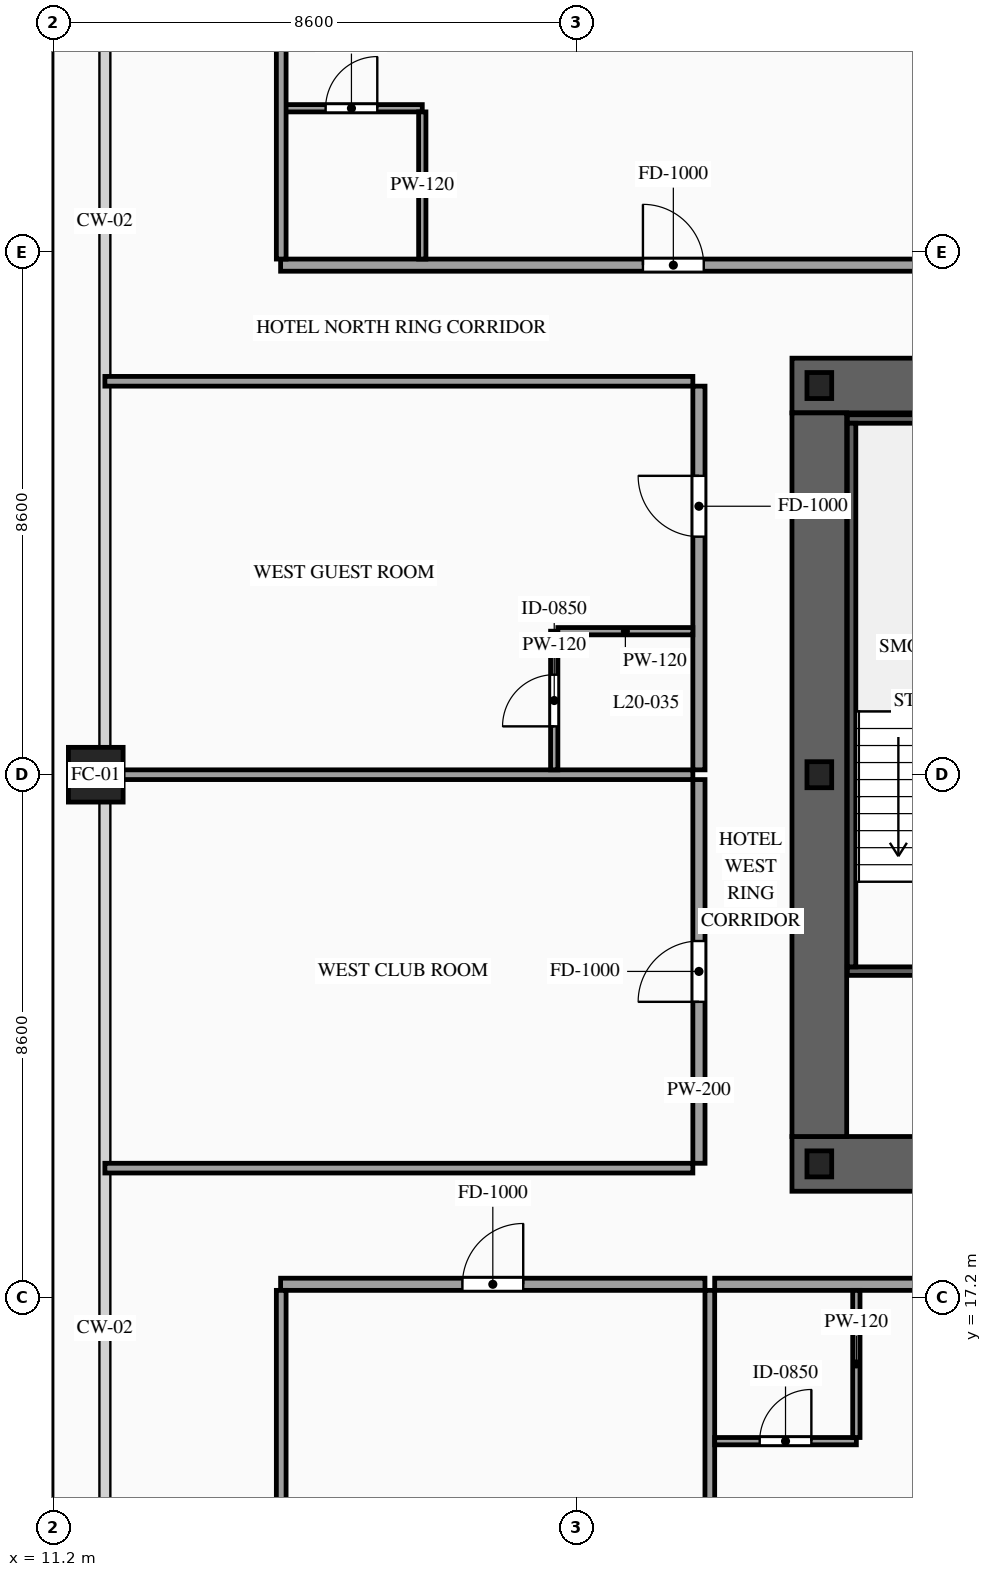
"""IFC4 building model, lengths in metres.
Left out: names, types, materials, properties, quantities, classifications, styles, units other than length and angle.
Written with IfcOpenShell. Run it as: python <this file> out.ifc"""

import sys

from ifc_helpers import new_model, si_unit, direction, frame, frame_2d, origin, origin_2d, place, context, subcontext, project, spatial, rectangle, hollow_rectangle, i_section, extrude, source, transform, mapped, element, fill, save


model = new_model("IFC4")
c1 = context("Model", 3, precision=1e-05, world=origin(), true_north=direction((0.0, 1.0)))
c2 = subcontext(c1, "Body", "Model", "MODEL_VIEW")
j1 = project(units=[si_unit("LENGTHUNIT", "METRE"), si_unit("PLANEANGLEUNIT", "RADIAN")], contexts=[c1])
p1 = place(None, origin())
s1 = spatial("IfcSite", under=j1, at=p1, CompositionType="ELEMENT")
p2 = place(p1, origin())
s2 = spatial("IfcBuilding", under=s1, at=p2, CompositionType="ELEMENT")
p3 = place(p2, frame((0.0, 0.0, 78.4)))
s3 = spatial("IfcBuildingStorey", under=s2, at=p3, CompositionType="ELEMENT", Elevation=78.4)
p4 = place(p3, frame((23.35, 19.4, 0.0), z_axis=(0.0, 0.0, 1.0), x_axis=(1.0, 0.0, 0.0)))
e1 = element("IfcWall", 1, at=p4, inside=s3, PredefinedType="SHEAR", context=c2, shape_type="SweptSolid", body=[
    extrude(rectangle(XDim=27.3, YDim=0.9, at=frame_2d((13.65, 0.0))), origin(), (0.0, 0.0, 1.0), 3.6),
])
p5 = place(p4, frame((2.1, 0.0, 0.0)))
e2 = element("IfcOpeningElement", 2, at=p5, cuts=e1, PredefinedType="OPENING", context=c2, shape_type="SweptSolid", body=[
    extrude(rectangle(XDim=1.1, YDim=2.2, at=frame_2d((0.55, 1.1))), frame((0.0, 0.465, 0.0), z_axis=(0.0, -1.0, 0.0), x_axis=(1.0, 0.0, 0.0)), (0.0, 0.0, 1.0), 0.93),
])
p6 = place(p4, frame((10.0, 0.0, 0.0)))
e3 = element("IfcOpeningElement", 3, at=p6, cuts=e1, PredefinedType="OPENING", context=c2, shape_type="SweptSolid", body=[
    extrude(rectangle(XDim=1.1, YDim=2.2, at=frame_2d((0.55, 1.1))), frame((0.0, 0.465, 0.0), z_axis=(0.0, -1.0, 0.0), x_axis=(1.0, 0.0, 0.0)), (0.0, 0.0, 1.0), 0.93),
])
p7 = place(p4, frame((23.2, 0.0, 0.0)))
e4 = element("IfcOpeningElement", 4, at=p7, cuts=e1, PredefinedType="OPENING", context=c2, shape_type="SweptSolid", body=[
    extrude(rectangle(XDim=1.1, YDim=2.2, at=frame_2d((0.55, 1.1))), frame((0.0, 0.465, 0.0), z_axis=(0.0, -1.0, 0.0), x_axis=(1.0, 0.0, 0.0)), (0.0, 0.0, 1.0), 0.93),
])
p8 = place(p4, frame((19.82, 0.0, 0.0)))
e5 = element("IfcOpeningElement", 5, at=p8, cuts=e1, PredefinedType="OPENING", context=c2, shape_type="SweptSolid", body=[
    extrude(rectangle(XDim=0.9, YDim=2.15, at=frame_2d((0.45, 1.075))), frame((0.0, 0.465, 0.0), z_axis=(0.0, -1.0, 0.0), x_axis=(1.0, 0.0, 0.0)), (0.0, 0.0, 1.0), 0.93),
])
p9 = place(p4, frame((18.38, 0.0, 0.0)))
e6 = element("IfcOpeningElement", 6, at=p9, cuts=e1, PredefinedType="OPENING", context=c2, shape_type="SweptSolid", body=[
    extrude(rectangle(XDim=0.9, YDim=2.15, at=frame_2d((0.45, 1.075))), frame((0.0, 0.465, 0.0), z_axis=(0.0, -1.0, 0.0), x_axis=(1.0, 0.0, 0.0)), (0.0, 0.0, 1.0), 0.93),
])
p10 = place(p3, frame((23.35, 32.2, 0.0), z_axis=(0.0, 0.0, 1.0), x_axis=(1.0, 0.0, 0.0)))
e7 = element("IfcWall", 7, at=p10, inside=s3, PredefinedType="SHEAR", context=c2, shape_type="SweptSolid", body=[
    extrude(rectangle(XDim=27.3, YDim=0.9, at=frame_2d((13.65, 0.0))), origin(), (0.0, 0.0, 1.0), 3.6),
])
p11 = place(p10, frame((4.72, 0.0, 0.0)))
e8 = element("IfcOpeningElement", 8, at=p11, cuts=e7, PredefinedType="OPENING", context=c2, shape_type="SweptSolid", body=[
    extrude(rectangle(XDim=0.9, YDim=2.15, at=frame_2d((0.45, 1.075))), frame((0.0, 0.465, 0.0), z_axis=(0.0, -1.0, 0.0), x_axis=(1.0, 0.0, 0.0)), (0.0, 0.0, 1.0), 0.93),
])
p12 = place(p10, frame((10.0, 0.0, 0.0)))
e9 = element("IfcOpeningElement", 9, at=p12, cuts=e7, PredefinedType="OPENING", context=c2, shape_type="SweptSolid", body=[
    extrude(rectangle(XDim=1.1, YDim=2.2, at=frame_2d((0.55, 1.1))), frame((0.0, 0.465, 0.0), z_axis=(0.0, -1.0, 0.0), x_axis=(1.0, 0.0, 0.0)), (0.0, 0.0, 1.0), 0.93),
])
p13 = place(p10, frame((15.85, 0.0, 0.0)))
e10 = element("IfcOpeningElement", 10, at=p13, cuts=e7, PredefinedType="OPENING", context=c2, shape_type="SweptSolid", body=[
    extrude(rectangle(XDim=1.1, YDim=2.2, at=frame_2d((0.55, 1.1))), frame((0.0, 0.465, 0.0), z_axis=(0.0, -1.0, 0.0), x_axis=(1.0, 0.0, 0.0)), (0.0, 0.0, 1.0), 0.93),
])
m1 = source(origin(), c2, "Body", "SweptSolid", [
    extrude(rectangle(XDim=11.9, YDim=0.9, at=frame_2d((5.95, 0.0))), origin(), (0.0, 0.0, 1.0), 3.6),
])
p14 = place(p3, frame((23.8, 19.85, 0.0), z_axis=(0.0, 0.0, 1.0), x_axis=(0.0, 1.0, 0.0)))
e11 = element("IfcWall", 11, at=p14, inside=s3, PredefinedType="SHEAR", context=c2, shape_type="MappedRepresentation", body=[
    mapped(m1, transform((0.0, 0.0, 0.0), scale=1.0)),
])
m2 = source(origin(), c2, "Body", "SweptSolid", [
    extrude(i_section(OverallWidth=0.407, OverallDepth=0.428, WebThickness=0.02, FlangeThickness=0.035, at=origin_2d()), origin(), (0.0, 0.0, 1.0), 3.6),
])
for number, where, z_axis, x_axis in (
    (12, (23.8, 19.4, 0.0), (0.0, 0.0, 1.0), (1.0, 0.0, 0.0)),
    (13, (23.8, 25.8, 0.0), (0.0, 0.0, 1.0), (1.0, 0.0, 0.0)),
    (14, (23.8, 32.2, 0.0), (0.0, 0.0, 1.0), (1.0, 0.0, 0.0)),
):
    element("IfcColumn", number, at=place(p3, frame(where, z_axis=z_axis, x_axis=x_axis)), inside=s3, PredefinedType="COLUMN", context=c2, shape_type="MappedRepresentation", body=[
        mapped(m2, transform((0.0, 0.0, 0.0), scale=1.0)),
    ])
m3 = source(origin(), c2, "Body", "SweptSolid", [
    extrude(hollow_rectangle(XDim=0.9, YDim=0.9, WallThickness=0.042, at=origin_2d()), origin(), (0.0, 0.0, 1.0), 3.6),
])
p15 = place(p3, frame((11.9, 25.8, 0.0), z_axis=(0.0, 0.0, 1.0), x_axis=(1.0, 0.0, 0.0)))
e15 = element("IfcColumn", 15, at=p15, inside=s3, PredefinedType="COLUMN", context=c2, shape_type="MappedRepresentation", body=[
    mapped(m3, transform((0.0, 0.0, 0.0), scale=1.0)),
])
p16 = place(p3, frame((24.26, 22.57, 0.0), z_axis=(0.0, 0.0, 1.0), x_axis=(1.0, 0.0, 0.0)))
e16 = element("IfcWall", 16, at=p16, inside=s3, PredefinedType="SOLIDWALL", context=c2, shape_type="SweptSolid", body=[
    extrude(rectangle(XDim=3.28, YDim=0.14, at=frame_2d((1.64, 0.0))), origin(), (0.0, 0.0, 1.0), 3.38),
])
p17 = place(p16, frame((1.09, 0.0, 0.0)))
e17 = element("IfcOpeningElement", 17, at=p17, cuts=e16, PredefinedType="OPENING", context=c2, shape_type="SweptSolid", body=[
    extrude(rectangle(XDim=1.1, YDim=2.2, at=frame_2d((0.55, 1.1))), frame((0.0, 0.085, 0.0), z_axis=(0.0, -1.0, 0.0), x_axis=(1.0, 0.0, 0.0)), (0.0, 0.0, 1.0), 0.17),
])
m4 = source(origin(), c2, "Body", "SweptSolid", [
    extrude(rectangle(XDim=3.28, YDim=0.14, at=frame_2d((1.64, 0.0))), origin(), (0.0, 0.0, 1.0), 3.38),
])
p18 = place(p3, frame((24.26, 31.65, 0.0), z_axis=(0.0, 0.0, 1.0), x_axis=(1.0, 0.0, 0.0)))
e18 = element("IfcWall", 18, at=p18, inside=s3, PredefinedType="SOLIDWALL", context=c2, shape_type="MappedRepresentation", body=[
    mapped(m4, transform((0.0, 0.0, 0.0), scale=1.0)),
])
m5 = source(origin(), c2, "Body", "SweptSolid", [
    extrude(rectangle(XDim=8.94, YDim=0.14, at=frame_2d((4.47, 0.0))), origin(), (0.0, 0.0, 1.0), 3.38),
])
p19 = place(p3, frame((24.33, 22.64, 0.0), z_axis=(0.0, 0.0, 1.0), x_axis=(0.0, 1.0, 0.0)))
e19 = element("IfcWall", 19, at=p19, inside=s3, PredefinedType="SOLIDWALL", context=c2, shape_type="MappedRepresentation", body=[
    mapped(m5, transform((0.0, 0.0, 0.0), scale=1.0)),
])
p20 = place(p3, frame((14.94, 17.42, 0.0), z_axis=(0.0, 0.0, 1.0), x_axis=(1.0, 0.0, 0.0)))
e20 = element("IfcWall", 20, at=p20, inside=s3, PredefinedType="PARTITIONING", context=c2, shape_type="SweptSolid", body=[
    extrude(rectangle(XDim=6.979, YDim=0.2, at=frame_2d((3.49, 0.0))), origin(), (0.0, 0.0, 1.0), 3.38),
])
p21 = place(p20, frame((2.99, 0.0, 0.0)))
e21 = element("IfcOpeningElement", 21, at=p21, cuts=e20, PredefinedType="OPENING", context=c2, shape_type="SweptSolid", body=[
    extrude(rectangle(XDim=1.0, YDim=2.2, at=frame_2d((0.5, 1.1))), frame((0.0, 0.115, 0.0), z_axis=(0.0, -1.0, 0.0), x_axis=(1.0, 0.0, 0.0)), (0.0, 0.0, 1.0), 0.23),
])
m6 = source(origin(), c2, "Body", "SweptSolid", [
    extrude(rectangle(XDim=16.47, YDim=0.16, at=frame_2d((8.235, 0.0))), origin(), (0.0, 0.0, 1.0), 3.38),
])
p22 = place(p3, frame((21.999, 0.85, 0.0), z_axis=(0.0, 0.0, 1.0), x_axis=(0.0, 1.0, 0.0)))
e22 = element("IfcWall", 22, at=p22, inside=s3, PredefinedType="PARTITIONING", context=c2, shape_type="MappedRepresentation", body=[
    mapped(m6, transform((0.0, 0.0, 0.0), scale=1.0)),
])
p23 = place(p3, frame((22.079, 17.42, 0.0), z_axis=(0.0, 0.0, 1.0), x_axis=(1.0, 0.0, 0.0)))
e23 = element("IfcWall", 23, at=p23, inside=s3, PredefinedType="PARTITIONING", context=c2, shape_type="SweptSolid", body=[
    extrude(rectangle(XDim=11.488, YDim=0.2, at=frame_2d((5.744, 0.0))), origin(), (0.0, 0.0, 1.0), 3.38),
])
p24 = place(p23, frame((6.449, 0.0, 0.0)))
e24 = element("IfcOpeningElement", 24, at=p24, cuts=e23, PredefinedType="OPENING", context=c2, shape_type="SweptSolid", body=[
    extrude(rectangle(XDim=1.0, YDim=2.2, at=frame_2d((0.5, 1.1))), frame((0.0, 0.115, 0.0), z_axis=(0.0, -1.0, 0.0), x_axis=(1.0, 0.0, 0.0)), (0.0, 0.0, 1.0), 0.23),
])
p25 = place(p3, frame((22.079, 14.84, 0.0), z_axis=(0.0, 0.0, 1.0), x_axis=(1.0, 0.0, 0.0)))
e25 = element("IfcWall", 25, at=p25, inside=s3, PredefinedType="PARTITIONING", context=c2, shape_type="SweptSolid", body=[
    extrude(rectangle(XDim=2.33, YDim=0.12, at=frame_2d((1.165, 0.0))), origin(), (0.0, 0.0, 1.0), 3.38),
])
p26 = place(p25, frame((0.74, 0.0, 0.0)))
e26 = element("IfcOpeningElement", 26, at=p26, cuts=e25, PredefinedType="OPENING", context=c2, shape_type="SweptSolid", body=[
    extrude(rectangle(XDim=0.85, YDim=2.1, at=frame_2d((0.425, 1.05))), frame((0.0, 0.075, 0.0), z_axis=(0.0, -1.0, 0.0), x_axis=(1.0, 0.0, 0.0)), (0.0, 0.0, 1.0), 0.15),
])
m7 = source(origin(), c2, "Body", "SweptSolid", [
    extrude(rectangle(XDim=2.42, YDim=0.12, at=frame_2d((1.21, 0.0))), origin(), (0.0, 0.0, 1.0), 3.38),
])
p27 = place(p3, frame((24.409, 14.9, 0.0), z_axis=(0.0, 0.0, 1.0), x_axis=(0.0, 1.0, 0.0)))
e27 = element("IfcWall", 27, at=p27, inside=s3, PredefinedType="PARTITIONING", context=c2, shape_type="MappedRepresentation", body=[
    mapped(m7, transform((0.0, 0.0, 0.0), scale=1.0)),
])
m8 = source(origin(), c2, "Body", "SweptSolid", [
    extrude(rectangle(XDim=16.32, YDim=0.16, at=frame_2d((8.16, 0.0))), origin(), (0.0, 0.0, 1.0), 3.38),
])
p28 = place(p3, frame((14.95, 1.0, 0.0), z_axis=(0.0, 0.0, 1.0), x_axis=(0.0, 1.0, 0.0)))
e28 = element("IfcWall", 28, at=p28, inside=s3, PredefinedType="PARTITIONING", context=c2, shape_type="MappedRepresentation", body=[
    mapped(m8, transform((0.0, 0.0, 0.0), scale=1.0)),
])
p29 = place(p3, frame((14.94, 34.18, 0.0), z_axis=(0.0, 0.0, 1.0), x_axis=(1.0, 0.0, 0.0)))
e29 = element("IfcWall", 29, at=p29, inside=s3, PredefinedType="PARTITIONING", context=c2, shape_type="SweptSolid", body=[
    extrude(rectangle(XDim=10.509, YDim=0.2, at=frame_2d((5.254, 0.0))), origin(), (0.0, 0.0, 1.0), 3.38),
])
p30 = place(p29, frame((5.959, 0.0, 0.0)))
e30 = element("IfcOpeningElement", 30, at=p30, cuts=e29, PredefinedType="OPENING", context=c2, shape_type="SweptSolid", body=[
    extrude(rectangle(XDim=1.0, YDim=2.2, at=frame_2d((0.5, 1.1))), frame((0.0, 0.115, 0.0), z_axis=(0.0, -1.0, 0.0), x_axis=(1.0, 0.0, 0.0)), (0.0, 0.0, 1.0), 0.23),
])
p31 = place(p3, frame((14.94, 36.76, 0.0), z_axis=(0.0, 0.0, 1.0), x_axis=(1.0, 0.0, 0.0)))
e31 = element("IfcWall", 31, at=p31, inside=s3, PredefinedType="PARTITIONING", context=c2, shape_type="SweptSolid", body=[
    extrude(rectangle(XDim=2.33, YDim=0.12, at=frame_2d((1.165, 0.0))), origin(), (0.0, 0.0, 1.0), 3.38),
])
p32 = place(p31, frame((0.74, 0.0, 0.0)))
e32 = element("IfcOpeningElement", 32, at=p32, cuts=e31, PredefinedType="OPENING", context=c2, shape_type="SweptSolid", body=[
    extrude(rectangle(XDim=0.85, YDim=2.1, at=frame_2d((0.425, 1.05))), frame((0.0, 0.075, 0.0), z_axis=(0.0, -1.0, 0.0), x_axis=(1.0, 0.0, 0.0)), (0.0, 0.0, 1.0), 0.15),
])
m9 = source(origin(), c2, "Body", "SweptSolid", [
    extrude(rectangle(XDim=2.42, YDim=0.12, at=frame_2d((1.21, 0.0))), origin(), (0.0, 0.0, 1.0), 3.38),
])
p33 = place(p3, frame((17.27, 34.28, 0.0), z_axis=(0.0, 0.0, 1.0), x_axis=(0.0, 1.0, 0.0)))
e33 = element("IfcWall", 33, at=p33, inside=s3, PredefinedType="PARTITIONING", context=c2, shape_type="MappedRepresentation", body=[
    mapped(m9, transform((0.0, 0.0, 0.0), scale=1.0)),
])
p34 = place(p3, frame((14.95, 34.28, 0.0), z_axis=(0.0, 0.0, 1.0), x_axis=(0.0, 1.0, 0.0)))
e34 = element("IfcWall", 34, at=p34, inside=s3, PredefinedType="PARTITIONING", context=c2, shape_type="MappedRepresentation", body=[
    mapped(m8, transform((0.0, 0.0, 0.0), scale=1.0)),
])
p35 = place(p3, frame((21.82, 19.41, 0.0), z_axis=(0.0, 0.0, 1.0), x_axis=(0.0, 1.0, 0.0)))
e35 = element("IfcWall", 35, at=p35, inside=s3, PredefinedType="PARTITIONING", context=c2, shape_type="SweptSolid", body=[
    extrude(rectangle(XDim=6.31, YDim=0.2, at=frame_2d((3.155, 0.0))), origin(), (0.0, 0.0, 1.0), 3.38),
])
p36 = place(p35, frame((2.655, 0.0, 0.0)))
e36 = element("IfcOpeningElement", 36, at=p36, cuts=e35, PredefinedType="OPENING", context=c2, shape_type="SweptSolid", body=[
    extrude(rectangle(XDim=1.0, YDim=2.2, at=frame_2d((0.5, 1.1))), frame((0.0, 0.115, 0.0), z_axis=(0.0, -1.0, 0.0), x_axis=(1.0, 0.0, 0.0)), (0.0, 0.0, 1.0), 0.23),
])
m10 = source(origin(), c2, "Body", "SweptSolid", [
    extrude(rectangle(XDim=9.67, YDim=0.16, at=frame_2d((4.835, 0.0))), origin(), (0.0, 0.0, 1.0), 2.575),
])
p37 = place(p3, frame((12.05, 25.8, 0.0), z_axis=(0.0, 0.0, 1.0), x_axis=(1.0, 0.0, 0.0)))
e37 = element("IfcWall", 37, at=p37, inside=s3, PredefinedType="PARTITIONING", context=c2, shape_type="MappedRepresentation", body=[
    mapped(m10, transform((0.0, 0.0, 0.0), scale=1.0)),
])
m11 = source(origin(), c2, "Body", "SweptSolid", [
    extrude(rectangle(XDim=9.67, YDim=0.16, at=frame_2d((4.835, 0.0))), origin(), (0.0, 0.0, 1.0), 2.875),
])
p38 = place(p3, frame((12.05, 19.33, 0.0), z_axis=(0.0, 0.0, 1.0), x_axis=(1.0, 0.0, 0.0)))
e38 = element("IfcWall", 38, at=p38, inside=s3, PredefinedType="PARTITIONING", context=c2, shape_type="MappedRepresentation", body=[
    mapped(m11, transform((0.0, 0.0, 0.0), scale=1.0)),
])
p39 = place(p3, frame((21.82, 25.88, 0.0), z_axis=(0.0, 0.0, 1.0), x_axis=(0.0, 1.0, 0.0)))
e39 = element("IfcWall", 39, at=p39, inside=s3, PredefinedType="PARTITIONING", context=c2, shape_type="SweptSolid", body=[
    extrude(rectangle(XDim=6.31, YDim=0.2, at=frame_2d((3.155, 0.0))), origin(), (0.0, 0.0, 1.0), 3.38),
])
p40 = place(p39, frame((3.835, 0.0, 0.0)))
e40 = element("IfcOpeningElement", 40, at=p40, cuts=e39, PredefinedType="OPENING", context=c2, shape_type="SweptSolid", body=[
    extrude(rectangle(XDim=1.0, YDim=2.2, at=frame_2d((0.5, 1.1))), frame((0.0, 0.115, 0.0), z_axis=(0.0, -1.0, 0.0), x_axis=(1.0, 0.0, 0.0)), (0.0, 0.0, 1.0), 0.23),
])
p41 = place(p3, frame((12.05, 32.27, 0.0), z_axis=(0.0, 0.0, 1.0), x_axis=(1.0, 0.0, 0.0)))
e41 = element("IfcWall", 41, at=p41, inside=s3, PredefinedType="PARTITIONING", context=c2, shape_type="MappedRepresentation", body=[
    mapped(m11, transform((0.0, 0.0, 0.0), scale=1.0)),
])
p42 = place(p3, frame((19.44, 25.88, 0.0), z_axis=(0.0, 0.0, 1.0), x_axis=(0.0, 1.0, 0.0)))
e42 = element("IfcWall", 42, at=p42, inside=s3, PredefinedType="PARTITIONING", context=c2, shape_type="SweptSolid", body=[
    extrude(rectangle(XDim=2.28, YDim=0.12, at=frame_2d((1.14, 0.0))), origin(), (0.0, 0.0, 1.0), 3.38),
])
p43 = place(p42, frame((0.715, 0.0, 0.0)))
e43 = element("IfcOpeningElement", 43, at=p43, cuts=e42, PredefinedType="OPENING", context=c2, shape_type="SweptSolid", body=[
    extrude(rectangle(XDim=0.85, YDim=2.1, at=frame_2d((0.425, 1.05))), frame((0.0, 0.075, 0.0), z_axis=(0.0, -1.0, 0.0), x_axis=(1.0, 0.0, 0.0)), (0.0, 0.0, 1.0), 0.15),
])
m12 = source(origin(), c2, "Body", "SweptSolid", [
    extrude(rectangle(XDim=2.22, YDim=0.12, at=frame_2d((1.11, 0.0))), origin(), (0.0, 0.0, 1.0), 3.38),
])
p44 = place(p3, frame((19.5, 28.16, 0.0), z_axis=(0.0, 0.0, 1.0), x_axis=(1.0, 0.0, 0.0)))
e44 = element("IfcWall", 44, at=p44, inside=s3, PredefinedType="PARTITIONING", context=c2, shape_type="MappedRepresentation", body=[
    mapped(m12, transform((0.0, 0.0, 0.0), scale=1.0)),
])
m13 = source(origin(), c2, "Body", "SweptSolid", [
    extrude(rectangle(XDim=1.0, YDim=2.2, at=frame_2d((0.5, 1.1))), frame((0.0, 0.025, 0.0), z_axis=(0.0, -1.0, 0.0), x_axis=(1.0, 0.0, 0.0)), (0.0, 0.0, 1.0), 0.05),
])
p45 = place(p21, origin())
e45 = element("IfcDoor", 45, at=p45, inside=s3, OperationType="SINGLE_SWING_RIGHT", PredefinedType="DOOR", context=c2, shape_type="MappedRepresentation", body=[
    mapped(m13, transform((0.0, 0.0, 0.0), scale=1.0)),
])
fill(e21, e45)
m14 = source(origin(), c2, "Body", "SweptSolid", [
    extrude(rectangle(XDim=0.85, YDim=2.1, at=frame_2d((0.425, 1.05))), frame((0.0, 0.025, 0.0), z_axis=(0.0, -1.0, 0.0), x_axis=(1.0, 0.0, 0.0)), (0.0, 0.0, 1.0), 0.05),
])
p46 = place(p26, origin())
e46 = element("IfcDoor", 46, at=p46, inside=s3, OperationType="SINGLE_SWING_RIGHT", PredefinedType="DOOR", context=c2, shape_type="MappedRepresentation", body=[
    mapped(m14, transform((0.0, 0.0, 0.0), scale=1.0)),
])
fill(e26, e46)
p47 = place(p30, origin())
e47 = element("IfcDoor", 47, at=p47, inside=s3, OperationType="SINGLE_SWING_LEFT", PredefinedType="DOOR", context=c2, shape_type="MappedRepresentation", body=[
    mapped(m13, transform((0.0, 0.0, 0.0), scale=1.0)),
])
fill(e30, e47)
p48 = place(p32, origin())
e48 = element("IfcDoor", 48, at=p48, inside=s3, OperationType="SINGLE_SWING_RIGHT", PredefinedType="DOOR", context=c2, shape_type="MappedRepresentation", body=[
    mapped(m14, transform((0.0, 0.0, 0.0), scale=1.0)),
])
fill(e32, e48)
p49 = place(p36, origin())
e49 = element("IfcDoor", 49, at=p49, inside=s3, OperationType="SINGLE_SWING_LEFT", PredefinedType="DOOR", context=c2, shape_type="MappedRepresentation", body=[
    mapped(m13, transform((0.0, 0.0, 0.0), scale=1.0)),
])
fill(e36, e49)
p50 = place(p40, origin())
e50 = element("IfcDoor", 50, at=p50, inside=s3, OperationType="SINGLE_SWING_RIGHT", PredefinedType="DOOR", context=c2, shape_type="MappedRepresentation", body=[
    mapped(m13, transform((0.0, 0.0, 0.0), scale=1.0)),
])
fill(e40, e50)
p51 = place(p43, origin())
e51 = element("IfcDoor", 51, at=p51, inside=s3, OperationType="SINGLE_SWING_LEFT", PredefinedType="DOOR", context=c2, shape_type="MappedRepresentation", body=[
    mapped(m14, transform((0.0, 0.0, 0.0), scale=1.0)),
])
fill(e43, e51)
save(model, sys.argv[1])
